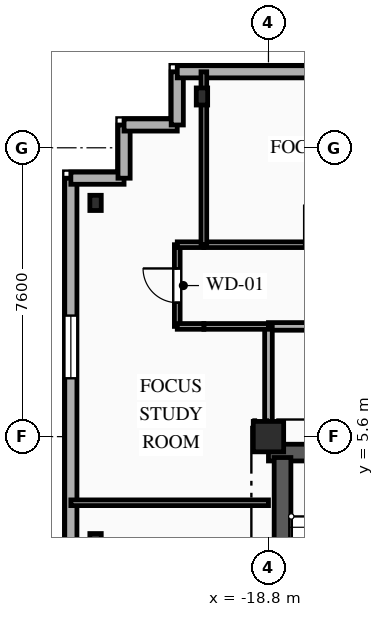
"""IFC4 building model, lengths in metres.
Left out: names, types, materials, properties, quantities, classifications, styles, units other than length and angle.
Written with IfcOpenShell. Run it as: python <this file> out.ifc"""

import sys

from ifc_helpers import new_model, si_unit, direction, frame, frame_2d, origin, origin_2d, place, context, subcontext, project, spatial, rectangle, i_section, extrude, element, fill, save


model = new_model("IFC4")
c1 = context("Model", 3, precision=1e-05, world=origin(), true_north=direction((0.0, 1.0)))
c2 = subcontext(c1, "Body", "Model", "MODEL_VIEW")
j1 = project(units=[si_unit("LENGTHUNIT", "METRE"), si_unit("PLANEANGLEUNIT", "RADIAN")], contexts=[c1])
p1 = place(None, origin())
s1 = spatial("IfcSite", under=j1, at=p1, CompositionType="ELEMENT")
p2 = place(p1, origin())
s2 = spatial("IfcBuilding", under=s1, at=p2, CompositionType="ELEMENT")
p3 = place(p2, frame((0.0, 0.0, 258.45)))
s3 = spatial("IfcBuildingStorey", under=s2, at=p3, CompositionType="ELEMENT", Elevation=258.45)
p4 = place(p3, frame((-18.8, 5.6, 0.0), z_axis=(0.0, 0.0, 1.0), x_axis=(1.0, 0.0, 0.0)))
e1 = element("IfcColumn", 1, at=p4, inside=s3, PredefinedType="COLUMN", context=c2, shape_type="SweptSolid", body=[
    extrude(rectangle(XDim=0.8, YDim=0.8, at=origin_2d()), origin(), (0.0, 0.0, 1.0), 3.35),
])
p5 = place(p3, frame((-20.55, 14.55, 0.0), z_axis=(0.0, 0.0, 1.0), x_axis=(1.0, 0.0, 0.0)))
e2 = element("IfcColumn", 2, at=p5, inside=s3, PredefinedType="COLUMN", context=c2, shape_type="SweptSolid", body=[
    extrude(i_section(OverallWidth=0.3, OverallDepth=0.45, WebThickness=0.014, FlangeThickness=0.026, FilletRadius=0.027, at=origin_2d()), origin(), (0.0, 0.0, 1.0), 3.35),
])
for number, where, z_axis, x_axis in (
    (3, (-23.35, 11.75, 0.0), (0.0, 0.0, 1.0), (1.0, 0.0, 0.0)),
    (4, (-23.35, 2.85, 0.0), (0.0, 0.0, 1.0), (1.0, 0.0, 0.0)),
):
    element("IfcColumn", number, at=place(p3, frame(where, z_axis=z_axis, x_axis=x_axis)), inside=s3, PredefinedType="COLUMN", context=c2, shape_type="SweptSolid", body=[
        extrude(i_section(OverallWidth=0.3, OverallDepth=0.4, WebThickness=0.013, FlangeThickness=0.024, FilletRadius=0.027, at=origin_2d()), origin(), (0.0, 0.0, 1.0), 3.35),
    ])
p6 = place(p3, frame((-24.0, -15.6, 0.0), z_axis=(0.0, 0.0, 1.0), x_axis=(0.0, 1.0, 0.0)))
e5 = element("IfcWall", 5, at=p6, inside=s3, PredefinedType="SOLIDWALL", context=c2, shape_type="SweptSolid", body=[
    extrude(rectangle(XDim=28.0, YDim=0.32, at=frame_2d((14.0, 0.0))), origin(), (0.0, 0.0, 1.0), 3.03),
])
p7 = place(p6, frame((3.695, 0.0, 0.85)))
e6 = element("IfcOpeningElement", 6, at=p7, cuts=e5, PredefinedType="OPENING", context=c2, shape_type="SweptSolid", body=[
    extrude(rectangle(XDim=1.65, YDim=1.85, at=frame_2d((0.825, 0.925))), frame((0.0, 0.17, 0.0), z_axis=(0.0, -1.0, 0.0), x_axis=(1.0, 0.0, 0.0)), (0.0, 0.0, 1.0), 0.34),
])
p8 = place(p6, frame((13.215, 0.0, 0.85)))
e7 = element("IfcOpeningElement", 7, at=p8, cuts=e5, PredefinedType="OPENING", context=c2, shape_type="SweptSolid", body=[
    extrude(rectangle(XDim=1.65, YDim=1.85, at=frame_2d((0.825, 0.925))), frame((0.0, 0.17, 0.0), z_axis=(0.0, -1.0, 0.0), x_axis=(1.0, 0.0, 0.0)), (0.0, 0.0, 1.0), 0.34),
])
p9 = place(p6, frame((22.735, 0.0, 0.85)))
e8 = element("IfcOpeningElement", 8, at=p9, cuts=e5, PredefinedType="OPENING", context=c2, shape_type="SweptSolid", body=[
    extrude(rectangle(XDim=1.65, YDim=1.85, at=frame_2d((0.825, 0.925))), frame((0.0, 0.17, 0.0), z_axis=(0.0, -1.0, 0.0), x_axis=(1.0, 0.0, 0.0)), (0.0, 0.0, 1.0), 0.34),
])
p10 = place(p3, frame((-24.0, 12.4, 0.0), z_axis=(0.0, 0.0, 1.0), x_axis=(1.0, 0.0, 0.0)))
e9 = element("IfcWall", 9, at=p10, inside=s3, PredefinedType="SOLIDWALL", context=c2, shape_type="SweptSolid", body=[
    extrude(rectangle(XDim=1.4, YDim=0.32, at=frame_2d((0.7, 0.0))), origin(), (0.0, 0.0, 1.0), 3.03),
])
for number, where, z_axis, x_axis in (
    (10, (-22.6, 12.4, 0.0), (0.0, 0.0, 1.0), (0.0, 1.0, 0.0)),
    (11, (-22.6, 13.8, 0.0), (0.0, 0.0, 1.0), (1.0, 0.0, 0.0)),
):
    element("IfcWall", number, at=place(p3, frame(where, z_axis=z_axis, x_axis=x_axis)), inside=s3, PredefinedType="SOLIDWALL", context=c2, shape_type="SweptSolid", body=[
        extrude(rectangle(XDim=1.4, YDim=0.32, at=frame_2d((0.7, 0.0))), origin(), (0.0, 0.0, 1.0), 3.03),
    ])
p11 = place(p3, frame((-21.2, 13.8, 0.0), z_axis=(0.0, 0.0, 1.0), x_axis=(0.0, 1.0, 0.0)))
e12 = element("IfcWall", 12, at=p11, inside=s3, PredefinedType="SOLIDWALL", context=c2, shape_type="SweptSolid", body=[
    extrude(rectangle(XDim=1.4, YDim=0.32, at=frame_2d((0.7, 0.0))), origin(), (0.0, 0.0, 1.0), 3.03),
])
p12 = place(p3, frame((-21.2, 15.2, 0.0), z_axis=(0.0, 0.0, 1.0), x_axis=(1.0, 0.0, 0.0)))
e13 = element("IfcWall", 13, at=p12, inside=s3, PredefinedType="SOLIDWALL", context=c2, shape_type="SweptSolid", body=[
    extrude(rectangle(XDim=42.0, YDim=0.32, at=frame_2d((21.0, 0.0))), origin(), (0.0, 0.0, 1.0), 3.03),
])
p13 = place(p12, frame((3.735, 0.0, 0.85)))
e14 = element("IfcOpeningElement", 14, at=p13, cuts=e13, PredefinedType="OPENING", context=c2, shape_type="SweptSolid", body=[
    extrude(rectangle(XDim=1.65, YDim=1.85, at=frame_2d((0.825, 0.925))), frame((0.0, 0.17, 0.0), z_axis=(0.0, -1.0, 0.0), x_axis=(1.0, 0.0, 0.0)), (0.0, 0.0, 1.0), 0.34),
])
p14 = place(p12, frame((12.92, 0.0, 0.85)))
e15 = element("IfcOpeningElement", 15, at=p14, cuts=e13, PredefinedType="OPENING", context=c2, shape_type="SweptSolid", body=[
    extrude(rectangle(XDim=1.6, YDim=1.85, at=frame_2d((0.8, 0.925))), frame((0.0, 0.17, 0.0), z_axis=(0.0, -1.0, 0.0), x_axis=(1.0, 0.0, 0.0)), (0.0, 0.0, 1.0), 0.34),
])
p15 = place(p12, frame((19.895, 0.0, 0.85)))
e16 = element("IfcOpeningElement", 16, at=p15, cuts=e13, PredefinedType="OPENING", context=c2, shape_type="SweptSolid", body=[
    extrude(rectangle(XDim=1.65, YDim=1.85, at=frame_2d((0.825, 0.925))), frame((0.0, 0.17, 0.0), z_axis=(0.0, -1.0, 0.0), x_axis=(1.0, 0.0, 0.0)), (0.0, 0.0, 1.0), 0.34),
])
p16 = place(p12, frame((28.095, 0.0, 0.85)))
e17 = element("IfcOpeningElement", 17, at=p16, cuts=e13, PredefinedType="OPENING", context=c2, shape_type="SweptSolid", body=[
    extrude(rectangle(XDim=1.65, YDim=1.85, at=frame_2d((0.825, 0.925))), frame((0.0, 0.17, 0.0), z_axis=(0.0, -1.0, 0.0), x_axis=(1.0, 0.0, 0.0)), (0.0, 0.0, 1.0), 0.34),
])
p17 = place(p12, frame((36.495, 0.0, 0.85)))
e18 = element("IfcOpeningElement", 18, at=p17, cuts=e13, PredefinedType="OPENING", context=c2, shape_type="SweptSolid", body=[
    extrude(rectangle(XDim=1.65, YDim=1.85, at=frame_2d((0.825, 0.925))), frame((0.0, 0.17, 0.0), z_axis=(0.0, -1.0, 0.0), x_axis=(1.0, 0.0, 0.0)), (0.0, 0.0, 1.0), 0.34),
])
p18 = place(p3, frame((-18.8, 5.18, 0.0), z_axis=(0.0, 0.0, 1.0), x_axis=(1.0, 0.0, 0.0)))
e19 = element("IfcWall", 19, at=p18, inside=s3, PredefinedType="SHEAR", context=c2, shape_type="SweptSolid", body=[
    extrude(rectangle(XDim=9.6, YDim=0.44, at=frame_2d((4.8, 0.0))), origin(), (0.0, 0.0, 1.0), 3.03),
])
p19 = place(p18, frame((1.55, 0.0, 0.0)))
e20 = element("IfcOpeningElement", 20, at=p19, cuts=e19, PredefinedType="OPENING", context=c2, shape_type="SweptSolid", body=[
    extrude(rectangle(XDim=1.1, YDim=2.15, at=frame_2d((0.55, 1.075))), frame((0.0, 0.23, 0.0), z_axis=(0.0, -1.0, 0.0), x_axis=(1.0, 0.0, 0.0)), (0.0, 0.0, 1.0), 0.46),
])
p20 = place(p18, frame((4.775, 0.0, 0.0)))
e21 = element("IfcOpeningElement", 21, at=p20, cuts=e19, PredefinedType="OPENING", context=c2, shape_type="SweptSolid", body=[
    extrude(rectangle(XDim=1.05, YDim=2.1, at=frame_2d((0.525, 1.05))), frame((0.0, 0.23, 0.0), z_axis=(0.0, -1.0, 0.0), x_axis=(1.0, 0.0, 0.0)), (0.0, 0.0, 1.0), 0.46),
])
p21 = place(p3, frame((-18.43, -5.05, 0.0), z_axis=(0.0, 0.0, 1.0), x_axis=(0.0, 1.0, 0.0)))
e22 = element("IfcWall", 22, at=p21, inside=s3, PredefinedType="SHEAR", context=c2, shape_type="SweptSolid", body=[
    extrude(rectangle(XDim=10.1, YDim=0.44, at=frame_2d((5.05, 0.0))), origin(), (0.0, 0.0, 1.0), 3.03),
])
p22 = place(p3, frame((-12.0, 8.5, 0.0), z_axis=(0.0, 0.0, 1.0), x_axis=(-1.0, 0.0, 0.0)))
e23 = element("IfcWall", 23, at=p22, inside=s3, PredefinedType="PARTITIONING", context=c2, shape_type="SweptSolid", body=[
    extrude(rectangle(XDim=6.8, YDim=0.2, at=frame_2d((3.4, 0.0))), origin(), (0.0, 0.0, 1.0), 3.03),
])
p23 = place(p22, frame((1.715, 0.0, 0.0)))
e24 = element("IfcOpeningElement", 24, at=p23, cuts=e23, PredefinedType="OPENING", context=c2, shape_type="SweptSolid", body=[
    extrude(rectangle(XDim=1.1, YDim=2.15, at=frame_2d((0.55, 1.075))), frame((0.0, 0.11, 0.0), z_axis=(0.0, -1.0, 0.0), x_axis=(1.0, 0.0, 0.0)), (0.0, 0.0, 1.0), 0.22),
])
p24 = place(p3, frame((-18.8, 8.5, 0.0), z_axis=(0.0, 0.0, 1.0), x_axis=(0.0, -1.0, 0.0)))
e25 = element("IfcWall", 25, at=p24, inside=s3, PredefinedType="PARTITIONING", context=c2, shape_type="SweptSolid", body=[
    extrude(rectangle(XDim=2.9, YDim=0.2, at=frame_2d((1.45, 0.0))), origin(), (0.0, 0.0, 1.0), 2.655),
])
p25 = place(p3, frame((-21.2, 8.5, 0.0), z_axis=(0.0, 0.0, 1.0), x_axis=(0.0, 1.0, 0.0)))
e26 = element("IfcWall", 26, at=p25, inside=s3, PredefinedType="PARTITIONING", context=c2, shape_type="SweptSolid", body=[
    extrude(rectangle(XDim=2.15, YDim=0.15, at=frame_2d((1.075, 0.0))), origin(), (0.0, 0.0, 1.0), 2.685),
])
p26 = place(p25, frame((0.625, 0.0, 0.0)))
e27 = element("IfcOpeningElement", 27, at=p26, cuts=e26, PredefinedType="OPENING", context=c2, shape_type="SweptSolid", body=[
    extrude(rectangle(XDim=0.9, YDim=2.1, at=frame_2d((0.45, 1.05))), frame((0.0, 0.085, 0.0), z_axis=(0.0, -1.0, 0.0), x_axis=(1.0, 0.0, 0.0)), (0.0, 0.0, 1.0), 0.17),
])
p27 = place(p3, frame((-18.8, 8.5, 0.0), z_axis=(0.0, 0.0, 1.0), x_axis=(-1.0, 0.0, 0.0)))
e28 = element("IfcWall", 28, at=p27, inside=s3, PredefinedType="PARTITIONING", context=c2, shape_type="SweptSolid", body=[
    extrude(rectangle(XDim=1.7, YDim=0.15, at=frame_2d((0.85, 0.0))), origin(), (0.0, 0.0, 1.0), 3.03),
])
for number, where, z_axis, x_axis in (
    (29, (-20.5, 8.5, 0.0), (0.0, 0.0, 1.0), (-1.0, 0.0, 0.0)),
    (30, (-21.2, 10.65, 0.0), (0.0, 0.0, 1.0), (1.0, 0.0, 0.0)),
):
    element("IfcWall", number, at=place(p3, frame(where, z_axis=z_axis, x_axis=x_axis)), inside=s3, PredefinedType="PARTITIONING", context=c2, shape_type="SweptSolid", body=[
        extrude(rectangle(XDim=0.7, YDim=0.15, at=frame_2d((0.35, 0.0))), origin(), (0.0, 0.0, 1.0), 3.03),
    ])
p28 = place(p3, frame((-20.5, 10.65, 0.0), z_axis=(0.0, 0.0, 1.0), x_axis=(1.0, 0.0, 0.0)))
e31 = element("IfcWall", 31, at=p28, inside=s3, PredefinedType="PARTITIONING", context=c2, shape_type="SweptSolid", body=[
    extrude(rectangle(XDim=7.7, YDim=0.15, at=frame_2d((3.85, 0.0))), origin(), (0.0, 0.0, 1.0), 3.03),
])
p29 = place(p28, frame((2.639, 0.0, 0.0)))
e32 = element("IfcOpeningElement", 32, at=p29, cuts=e31, PredefinedType="OPENING", context=c2, shape_type="SweptSolid", body=[
    extrude(rectangle(XDim=1.05, YDim=2.15, at=frame_2d((0.525, 1.075))), frame((0.0, 0.085, 0.0), z_axis=(0.0, -1.0, 0.0), x_axis=(1.0, 0.0, 0.0)), (0.0, 0.0, 1.0), 0.17),
])
p30 = place(p3, frame((-24.0, 3.86, 0.0), z_axis=(0.0, 0.0, 1.0), x_axis=(1.0, 0.0, 0.0)))
e33 = element("IfcWall", 33, at=p30, inside=s3, PredefinedType="PARTITIONING", context=c2, shape_type="SweptSolid", body=[
    extrude(rectangle(XDim=5.2, YDim=0.15, at=frame_2d((2.6, 0.0))), origin(), (0.0, 0.0, 1.0), 3.03),
])
p31 = place(p3, frame((-20.5, 15.2, 0.0), z_axis=(0.0, 0.0, 1.0), x_axis=(0.0, -1.0, 0.0)))
e34 = element("IfcWall", 34, at=p31, inside=s3, PredefinedType="PARTITIONING", context=c2, shape_type="SweptSolid", body=[
    extrude(rectangle(XDim=4.55, YDim=0.15, at=frame_2d((2.275, 0.0))), origin(), (0.0, 0.0, 1.0), 2.655),
])
p32 = place(p9, origin())
e35 = element("IfcWindow", 35, at=p32, inside=s3, PartitioningType="SINGLE_PANEL", PredefinedType="WINDOW", context=c2, shape_type="SweptSolid", body=[
    extrude(rectangle(XDim=1.65, YDim=1.85, at=frame_2d((0.825, 0.925))), frame((0.0, 0.03, 0.0), z_axis=(0.0, -1.0, 0.0), x_axis=(1.0, 0.0, 0.0)), (0.0, 0.0, 1.0), 0.06),
])
fill(e8, e35)
p33 = place(p26, origin())
e36 = element("IfcDoor", 36, at=p33, inside=s3, OperationType="SINGLE_SWING_RIGHT", PredefinedType="DOOR", context=c2, shape_type="SweptSolid", body=[
    extrude(rectangle(XDim=0.9, YDim=2.1, at=frame_2d((0.45, 1.05))), frame((0.0, 0.025, 0.0), z_axis=(0.0, -1.0, 0.0), x_axis=(1.0, 0.0, 0.0)), (0.0, 0.0, 1.0), 0.05),
])
fill(e27, e36)
save(model, sys.argv[1])
